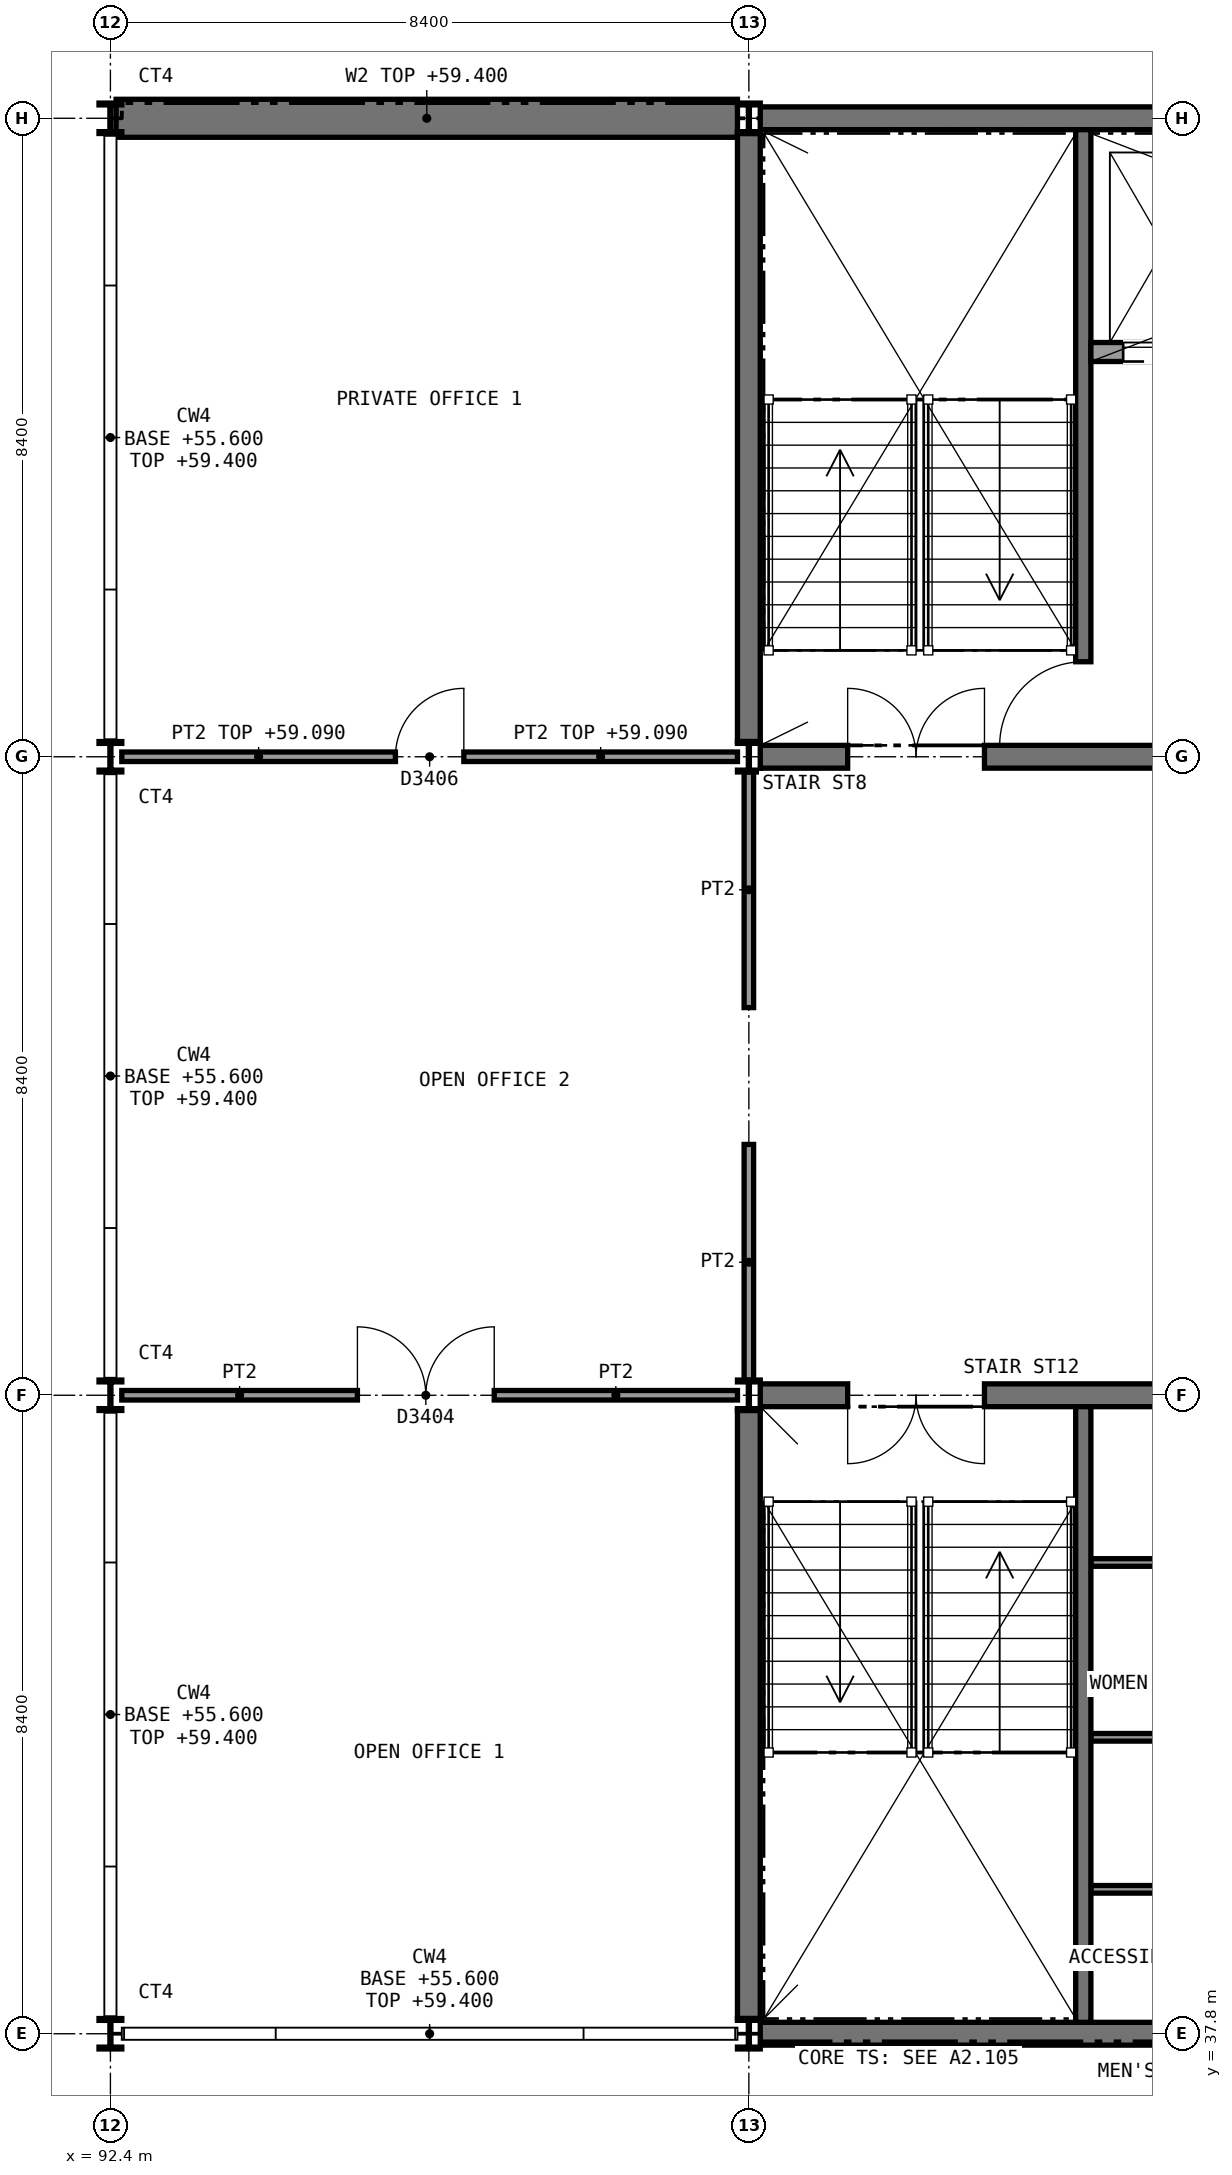
"""IFC4 building model, lengths in metres.
Left out: names, types, materials, properties, quantities, classifications, styles, units other than length and angle.
Written with IfcOpenShell. Run it as: python <this file> out.ifc"""

import sys

from ifc_helpers import new_model, si_unit, direction, frame, frame_2d, origin, origin_2d, place, context, subcontext, project, spatial, rectangle, i_section, extrude, element, fill, save


model = new_model("IFC4")
c1 = context("Model", 3, precision=1e-05, world=origin(), true_north=direction((0.0, 1.0)))
c2 = subcontext(c1, "Body", "Model", "MODEL_VIEW")
j1 = project(units=[si_unit("LENGTHUNIT", "METRE"), si_unit("PLANEANGLEUNIT", "RADIAN")], contexts=[c1])
p1 = place(None, origin())
s1 = spatial("IfcSite", under=j1, at=p1, CompositionType="ELEMENT")
p2 = place(p1, origin())
s2 = spatial("IfcBuilding", under=s1, at=p2, CompositionType="ELEMENT")
p3 = place(p2, frame((0.0, 0.0, 55.6)))
s3 = spatial("IfcBuildingStorey", under=s2, at=p3, CompositionType="ELEMENT", Elevation=55.6)
p4 = place(p3, frame((92.475, 63.0, 0.0), z_axis=(0.0, 0.0, 1.0), x_axis=(1.0, 0.0, 0.0)))
e1 = element("IfcWall", 1, at=p4, inside=s3, PredefinedType="SHEAR", context=c2, shape_type="SweptSolid", body=[
    extrude(rectangle(XDim=8.175, YDim=0.5, at=frame_2d((4.088, 0.0))), origin(), (0.0, 0.0, 1.0), 3.8),
])
p5 = place(p3, frame((100.95, 63.0, 0.0), z_axis=(0.0, 0.0, 1.0), x_axis=(1.0, 0.0, 0.0)))
e2 = element("IfcWall", 2, at=p5, inside=s3, PredefinedType="SHEAR", context=c2, shape_type="SweptSolid", body=[
    extrude(rectangle(XDim=16.45, YDim=0.3, at=frame_2d((8.225, 0.0))), origin(), (0.0, 0.0, 1.0), 3.85),
])
p6 = place(p3, frame((100.95, 54.6, 0.0), z_axis=(0.0, 0.0, 1.0), x_axis=(1.0, 0.0, 0.0)))
e3 = element("IfcWall", 3, at=p6, inside=s3, PredefinedType="SHEAR", context=c2, shape_type="SweptSolid", body=[
    extrude(rectangle(XDim=16.45, YDim=0.3, at=frame_2d((8.225, 0.0))), origin(), (0.0, 0.0, 1.0), 3.85),
])
p7 = place(p6, frame((1.15, 0.0, 0.0)))
e4 = element("IfcOpeningElement", 4, at=p7, cuts=e3, PredefinedType="OPENING", context=c2, shape_type="SweptSolid", body=[
    extrude(rectangle(XDim=1.8, YDim=2.1, at=frame_2d((0.9, 1.05))), frame((0.0, 0.16, 0.0), z_axis=(0.0, -1.0, 0.0), x_axis=(1.0, 0.0, 0.0)), (0.0, 0.0, 1.0), 0.32),
])
p8 = place(p6, frame((13.55, 0.0, 0.0)))
e5 = element("IfcOpeningElement", 5, at=p8, cuts=e3, PredefinedType="OPENING", context=c2, shape_type="SweptSolid", body=[
    extrude(rectangle(XDim=1.8, YDim=2.1, at=frame_2d((0.9, 1.05))), frame((0.0, 0.16, 0.0), z_axis=(0.0, -1.0, 0.0), x_axis=(1.0, 0.0, 0.0)), (0.0, 0.0, 1.0), 0.32),
])
p9 = place(p6, frame((7.05, 0.0, 0.0)))
e6 = element("IfcOpeningElement", 6, at=p9, cuts=e3, PredefinedType="OPENING", context=c2, shape_type="SweptSolid", body=[
    extrude(rectangle(XDim=2.4, YDim=2.4, at=frame_2d((1.2, 1.2))), frame((0.0, 0.16, 0.0), z_axis=(0.0, -1.0, 0.0), x_axis=(1.0, 0.0, 0.0)), (0.0, 0.0, 1.0), 0.32),
])
p10 = place(p3, frame((100.8, 54.8, 0.0), z_axis=(0.0, 0.0, 1.0), x_axis=(0.0, 1.0, 0.0)))
e7 = element("IfcWall", 7, at=p10, inside=s3, PredefinedType="SHEAR", context=c2, shape_type="SweptSolid", body=[
    extrude(rectangle(XDim=8.0, YDim=0.3, at=frame_2d((4.0, 0.0))), origin(), (0.0, 0.0, 1.0), 3.85),
])
p11 = place(p3, frame((100.95, 37.8, 0.0), z_axis=(0.0, 0.0, 1.0), x_axis=(1.0, 0.0, 0.0)))
e8 = element("IfcWall", 8, at=p11, inside=s3, PredefinedType="SHEAR", context=c2, shape_type="SweptSolid", body=[
    extrude(rectangle(XDim=8.1, YDim=0.3, at=frame_2d((4.05, 0.0))), origin(), (0.0, 0.0, 1.0), 3.85),
])
p12 = place(p3, frame((100.95, 46.2, 0.0), z_axis=(0.0, 0.0, 1.0), x_axis=(1.0, 0.0, 0.0)))
e9 = element("IfcWall", 9, at=p12, inside=s3, PredefinedType="SHEAR", context=c2, shape_type="SweptSolid", body=[
    extrude(rectangle(XDim=8.1, YDim=0.3, at=frame_2d((4.05, 0.0))), origin(), (0.0, 0.0, 1.0), 3.85),
])
p13 = place(p12, frame((1.15, 0.0, 0.0)))
e10 = element("IfcOpeningElement", 10, at=p13, cuts=e9, PredefinedType="OPENING", context=c2, shape_type="SweptSolid", body=[
    extrude(rectangle(XDim=1.8, YDim=2.1, at=frame_2d((0.9, 1.05))), frame((0.0, 0.16, 0.0), z_axis=(0.0, -1.0, 0.0), x_axis=(1.0, 0.0, 0.0)), (0.0, 0.0, 1.0), 0.32),
])
p14 = place(p12, frame((5.6, 0.0, 0.0)))
e11 = element("IfcOpeningElement", 11, at=p14, cuts=e9, PredefinedType="OPENING", context=c2, shape_type="SweptSolid", body=[
    extrude(rectangle(XDim=1.2, YDim=2.1, at=frame_2d((0.6, 1.05))), frame((0.0, 0.16, 0.0), z_axis=(0.0, -1.0, 0.0), x_axis=(1.0, 0.0, 0.0)), (0.0, 0.0, 1.0), 0.32),
])
p15 = place(p3, frame((100.8, 38.0, 0.0), z_axis=(0.0, 0.0, 1.0), x_axis=(0.0, 1.0, 0.0)))
e12 = element("IfcWall", 12, at=p15, inside=s3, PredefinedType="SHEAR", context=c2, shape_type="SweptSolid", body=[
    extrude(rectangle(XDim=8.0, YDim=0.3, at=frame_2d((4.0, 0.0))), origin(), (0.0, 0.0, 1.0), 3.85),
])
for number, where, z_axis, x_axis in (
    (13, (92.4, 37.8, 0.0), (0.0, 0.0, 1.0), (1.0, 0.0, 0.0)),
    (14, (92.4, 46.2, 0.0), (0.0, 0.0, 1.0), (1.0, 0.0, 0.0)),
    (15, (92.4, 54.6, 0.0), (0.0, 0.0, 1.0), (1.0, 0.0, 0.0)),
    (16, (92.4, 63.0, 0.0), (0.0, 0.0, 1.0), (1.0, 0.0, 0.0)),
    (17, (100.8, 37.8, 0.0), (0.0, 0.0, 1.0), (1.0, 0.0, 0.0)),
    (18, (100.8, 46.2, 0.0), (0.0, 0.0, 1.0), (1.0, 0.0, 0.0)),
    (19, (100.8, 54.6, 0.0), (0.0, 0.0, 1.0), (1.0, 0.0, 0.0)),
    (20, (100.8, 63.0, 0.0), (0.0, 0.0, 1.0), (1.0, 0.0, 0.0)),
):
    element("IfcColumn", number, at=place(p3, frame(where, z_axis=z_axis, x_axis=x_axis)), inside=s3, PredefinedType="COLUMN", context=c2, shape_type="SweptSolid", body=[
        extrude(i_section(OverallWidth=0.3, OverallDepth=0.4, WebThickness=0.013, FlangeThickness=0.024, FilletRadius=0.027, at=origin_2d()), origin(), (0.0, 0.0, 1.0), 4.0),
    ])
p16 = place(p3, frame((105.3, 44.0, 0.0), z_axis=(0.0, 0.0, 1.0), x_axis=(1.0, 0.0, 0.0)))
e21 = element("IfcWall", 21, at=p16, inside=s3, PredefinedType="PARTITIONING", context=c2, shape_type="SweptSolid", body=[
    extrude(rectangle(XDim=2.4, YDim=0.1, at=frame_2d((1.2, 0.0))), origin(), (0.0, 0.0, 1.0), 3.78),
])
p17 = place(p16, frame((0.85, 0.0, 0.0)))
e22 = element("IfcOpeningElement", 22, at=p17, cuts=e21, PredefinedType="OPENING", context=c2, shape_type="SweptSolid", body=[
    extrude(rectangle(XDim=0.9, YDim=2.1, at=frame_2d((0.45, 1.05))), frame((0.0, 0.06, 0.0), z_axis=(0.0, -1.0, 0.0), x_axis=(1.0, 0.0, 0.0)), (0.0, 0.0, 1.0), 0.12),
])
for number, where, z_axis, x_axis in (
    (23, (105.3, 41.7, 0.0), (0.0, 0.0, 1.0), (1.0, 0.0, 0.0)),
    (24, (105.3, 39.7, 0.0), (0.0, 0.0, 1.0), (1.0, 0.0, 0.0)),
):
    element("IfcWall", number, at=place(p3, frame(where, z_axis=z_axis, x_axis=x_axis)), inside=s3, PredefinedType="PARTITIONING", context=c2, shape_type="SweptSolid", body=[
        extrude(rectangle(XDim=2.4, YDim=0.1, at=frame_2d((1.2, 0.0))), origin(), (0.0, 0.0, 1.0), 3.78),
    ])
p18 = place(p3, frame((92.55, 46.2, 0.0), z_axis=(0.0, 0.0, 1.0), x_axis=(1.0, 0.0, 0.0)))
e25 = element("IfcWall", 25, at=p18, inside=s3, PredefinedType="PARTITIONING", context=c2, shape_type="SweptSolid", body=[
    extrude(rectangle(XDim=8.1, YDim=0.125, at=frame_2d((4.05, 0.0))), origin(), (0.0, 0.0, 1.0), 3.41),
])
p19 = place(p18, frame((3.1, 0.0, 0.0)))
e26 = element("IfcOpeningElement", 26, at=p19, cuts=e25, PredefinedType="OPENING", context=c2, shape_type="SweptSolid", body=[
    extrude(rectangle(XDim=1.8, YDim=2.1, at=frame_2d((0.9, 1.05))), frame((0.0, 0.073, 0.0), z_axis=(0.0, -1.0, 0.0), x_axis=(1.0, 0.0, 0.0)), (0.0, 0.0, 1.0), 0.145),
])
for number, where, z_axis, x_axis in (
    (27, (100.8, 46.4, 0.0), (0.0, 0.0, 1.0), (0.0, 1.0, 0.0)),
    (28, (100.8, 51.3, 0.0), (0.0, 0.0, 1.0), (0.0, 1.0, 0.0)),
):
    element("IfcWall", number, at=place(p3, frame(where, z_axis=z_axis, x_axis=x_axis)), inside=s3, PredefinedType="PARTITIONING", context=c2, shape_type="SweptSolid", body=[
        extrude(rectangle(XDim=3.1, YDim=0.125, at=frame_2d((1.55, 0.0))), origin(), (0.0, 0.0, 1.0), 3.41),
    ])
p20 = place(p3, frame((92.55, 54.6, 0.0), z_axis=(0.0, 0.0, 1.0), x_axis=(1.0, 0.0, 0.0)))
e29 = element("IfcWall", 29, at=p20, inside=s3, PredefinedType="PARTITIONING", context=c2, shape_type="SweptSolid", body=[
    extrude(rectangle(XDim=8.1, YDim=0.125, at=frame_2d((4.05, 0.0))), origin(), (0.0, 0.0, 1.0), 3.49),
])
p21 = place(p20, frame((3.6, 0.0, 0.0)))
e30 = element("IfcOpeningElement", 30, at=p21, cuts=e29, PredefinedType="OPENING", context=c2, shape_type="SweptSolid", body=[
    extrude(rectangle(XDim=0.9, YDim=2.1, at=frame_2d((0.45, 1.05))), frame((0.0, 0.073, 0.0), z_axis=(0.0, -1.0, 0.0), x_axis=(1.0, 0.0, 0.0)), (0.0, 0.0, 1.0), 0.145),
])
p22 = place(p3, frame((105.2, 62.85, 0.0), z_axis=(0.0, 0.0, 1.0), x_axis=(0.0, -1.0, 0.0)))
e31 = element("IfcWall", 31, at=p22, inside=s3, PredefinedType="SHEAR", context=c2, shape_type="SweptSolid", body=[
    extrude(rectangle(XDim=8.1, YDim=0.2, at=frame_2d((4.05, 0.0))), origin(), (0.0, 0.0, 1.0), 3.85),
])
p23 = place(p22, frame((7.0, 0.0, 0.0)))
e32 = element("IfcOpeningElement", 32, at=p23, cuts=e31, PredefinedType="OPENING", context=c2, shape_type="SweptSolid", body=[
    extrude(rectangle(XDim=1.11, YDim=2.1, at=frame_2d((0.555, 1.05))), frame((0.0, 0.11, 0.0), z_axis=(0.0, -1.0, 0.0), x_axis=(1.0, 0.0, 0.0)), (0.0, 0.0, 1.0), 0.22),
])
p24 = place(p3, frame((105.3, 59.925, 0.0), z_axis=(0.0, 0.0, 1.0), x_axis=(1.0, 0.0, 0.0)))
e33 = element("IfcWall", 33, at=p24, inside=s3, PredefinedType="SOLIDWALL", context=c2, shape_type="SweptSolid", body=[
    extrude(rectangle(XDim=1.95, YDim=0.25, at=frame_2d((0.975, 0.0))), origin(), (0.0, 0.0, 1.0), 4.0),
])
p25 = place(p24, frame((0.425, 0.0, 0.0)))
e34 = element("IfcOpeningElement", 34, at=p25, cuts=e33, PredefinedType="OPENING", context=c2, shape_type="SweptSolid", body=[
    extrude(rectangle(XDim=1.1, YDim=2.1, at=frame_2d((0.55, 1.05))), frame((0.0, 0.135, 0.0), z_axis=(0.0, -1.0, 0.0), x_axis=(1.0, 0.0, 0.0)), (0.0, 0.0, 1.0), 0.27),
])
p26 = place(p3, frame((105.2, 37.95, 0.0), z_axis=(0.0, 0.0, 1.0), x_axis=(0.0, 1.0, 0.0)))
e35 = element("IfcWall", 35, at=p26, inside=s3, PredefinedType="SHEAR", context=c2, shape_type="SweptSolid", body=[
    extrude(rectangle(XDim=8.1, YDim=0.2, at=frame_2d((4.05, 0.0))), origin(), (0.0, 0.0, 1.0), 3.85),
])
p27 = place(p19, origin())
e36 = element("IfcDoor", 36, at=p27, inside=s3, OperationType="DOUBLE_DOOR_SINGLE_SWING", PredefinedType="DOOR", context=c2, shape_type="SweptSolid", body=[
    extrude(rectangle(XDim=1.8, YDim=2.1, at=frame_2d((0.9, 1.05))), frame((0.0, 0.025, 0.0), z_axis=(0.0, -1.0, 0.0), x_axis=(1.0, 0.0, 0.0)), (0.0, 0.0, 1.0), 0.05),
])
fill(e26, e36)
p28 = place(p21, origin())
e37 = element("IfcDoor", 37, at=p28, inside=s3, OperationType="SINGLE_SWING_RIGHT", PredefinedType="DOOR", context=c2, shape_type="SweptSolid", body=[
    extrude(rectangle(XDim=0.9, YDim=2.1, at=frame_2d((0.45, 1.05))), frame((0.0, 0.025, 0.0), z_axis=(0.0, -1.0, 0.0), x_axis=(1.0, 0.0, 0.0)), (0.0, 0.0, 1.0), 0.05),
])
fill(e30, e37)
p29 = place(p23, frame((1.1, 0.0, 0.0), z_axis=(0.0, 0.0, 1.0), x_axis=(-1.0, 0.0, 0.0)))
e38 = element("IfcDoor", 38, at=p29, inside=s3, OperationType="SINGLE_SWING_LEFT", PredefinedType="DOOR", context=c2, shape_type="SweptSolid", body=[
    extrude(rectangle(XDim=1.1, YDim=2.1, at=frame_2d((0.55, 1.05))), frame((0.0, 0.025, 0.0), z_axis=(0.0, -1.0, 0.0), x_axis=(1.0, 0.0, 0.0)), (0.0, 0.0, 1.0), 0.05),
])
fill(e32, e38)
p30 = place(p25, frame((1.1, 0.0, 0.0), z_axis=(0.0, 0.0, 1.0), x_axis=(-1.0, 0.0, 0.0)))
e39 = element("IfcDoor", 39, at=p30, inside=s3, OperationType="SLIDING_TO_RIGHT", PredefinedType="DOOR", context=c2, shape_type="SweptSolid", body=[
    extrude(rectangle(XDim=1.1, YDim=2.1, at=frame_2d((0.55, 1.05))), frame((0.0, 0.025, 0.0), z_axis=(0.0, -1.0, 0.0), x_axis=(1.0, 0.0, 0.0)), (0.0, 0.0, 1.0), 0.05),
])
fill(e34, e39)
p31 = place(p7, origin())
e40 = element("IfcDoor", 40, at=p31, inside=s3, OperationType="DOUBLE_DOOR_SINGLE_SWING", PredefinedType="DOOR", context=c2, shape_type="SweptSolid", body=[
    extrude(rectangle(XDim=1.8, YDim=2.1, at=frame_2d((0.9, 1.05))), frame((0.0, 0.025, 0.0), z_axis=(0.0, -1.0, 0.0), x_axis=(1.0, 0.0, 0.0)), (0.0, 0.0, 1.0), 0.05),
])
fill(e4, e40)
p32 = place(p13, frame((1.8, 0.0, 0.0), z_axis=(0.0, 0.0, 1.0), x_axis=(-1.0, 0.0, 0.0)))
e41 = element("IfcDoor", 41, at=p32, inside=s3, OperationType="DOUBLE_DOOR_SINGLE_SWING", PredefinedType="DOOR", context=c2, shape_type="SweptSolid", body=[
    extrude(rectangle(XDim=1.8, YDim=2.1, at=frame_2d((0.9, 1.05))), frame((0.0, 0.025, 0.0), z_axis=(0.0, -1.0, 0.0), x_axis=(1.0, 0.0, 0.0)), (0.0, 0.0, 1.0), 0.05),
])
fill(e10, e41)
save(model, sys.argv[1])
